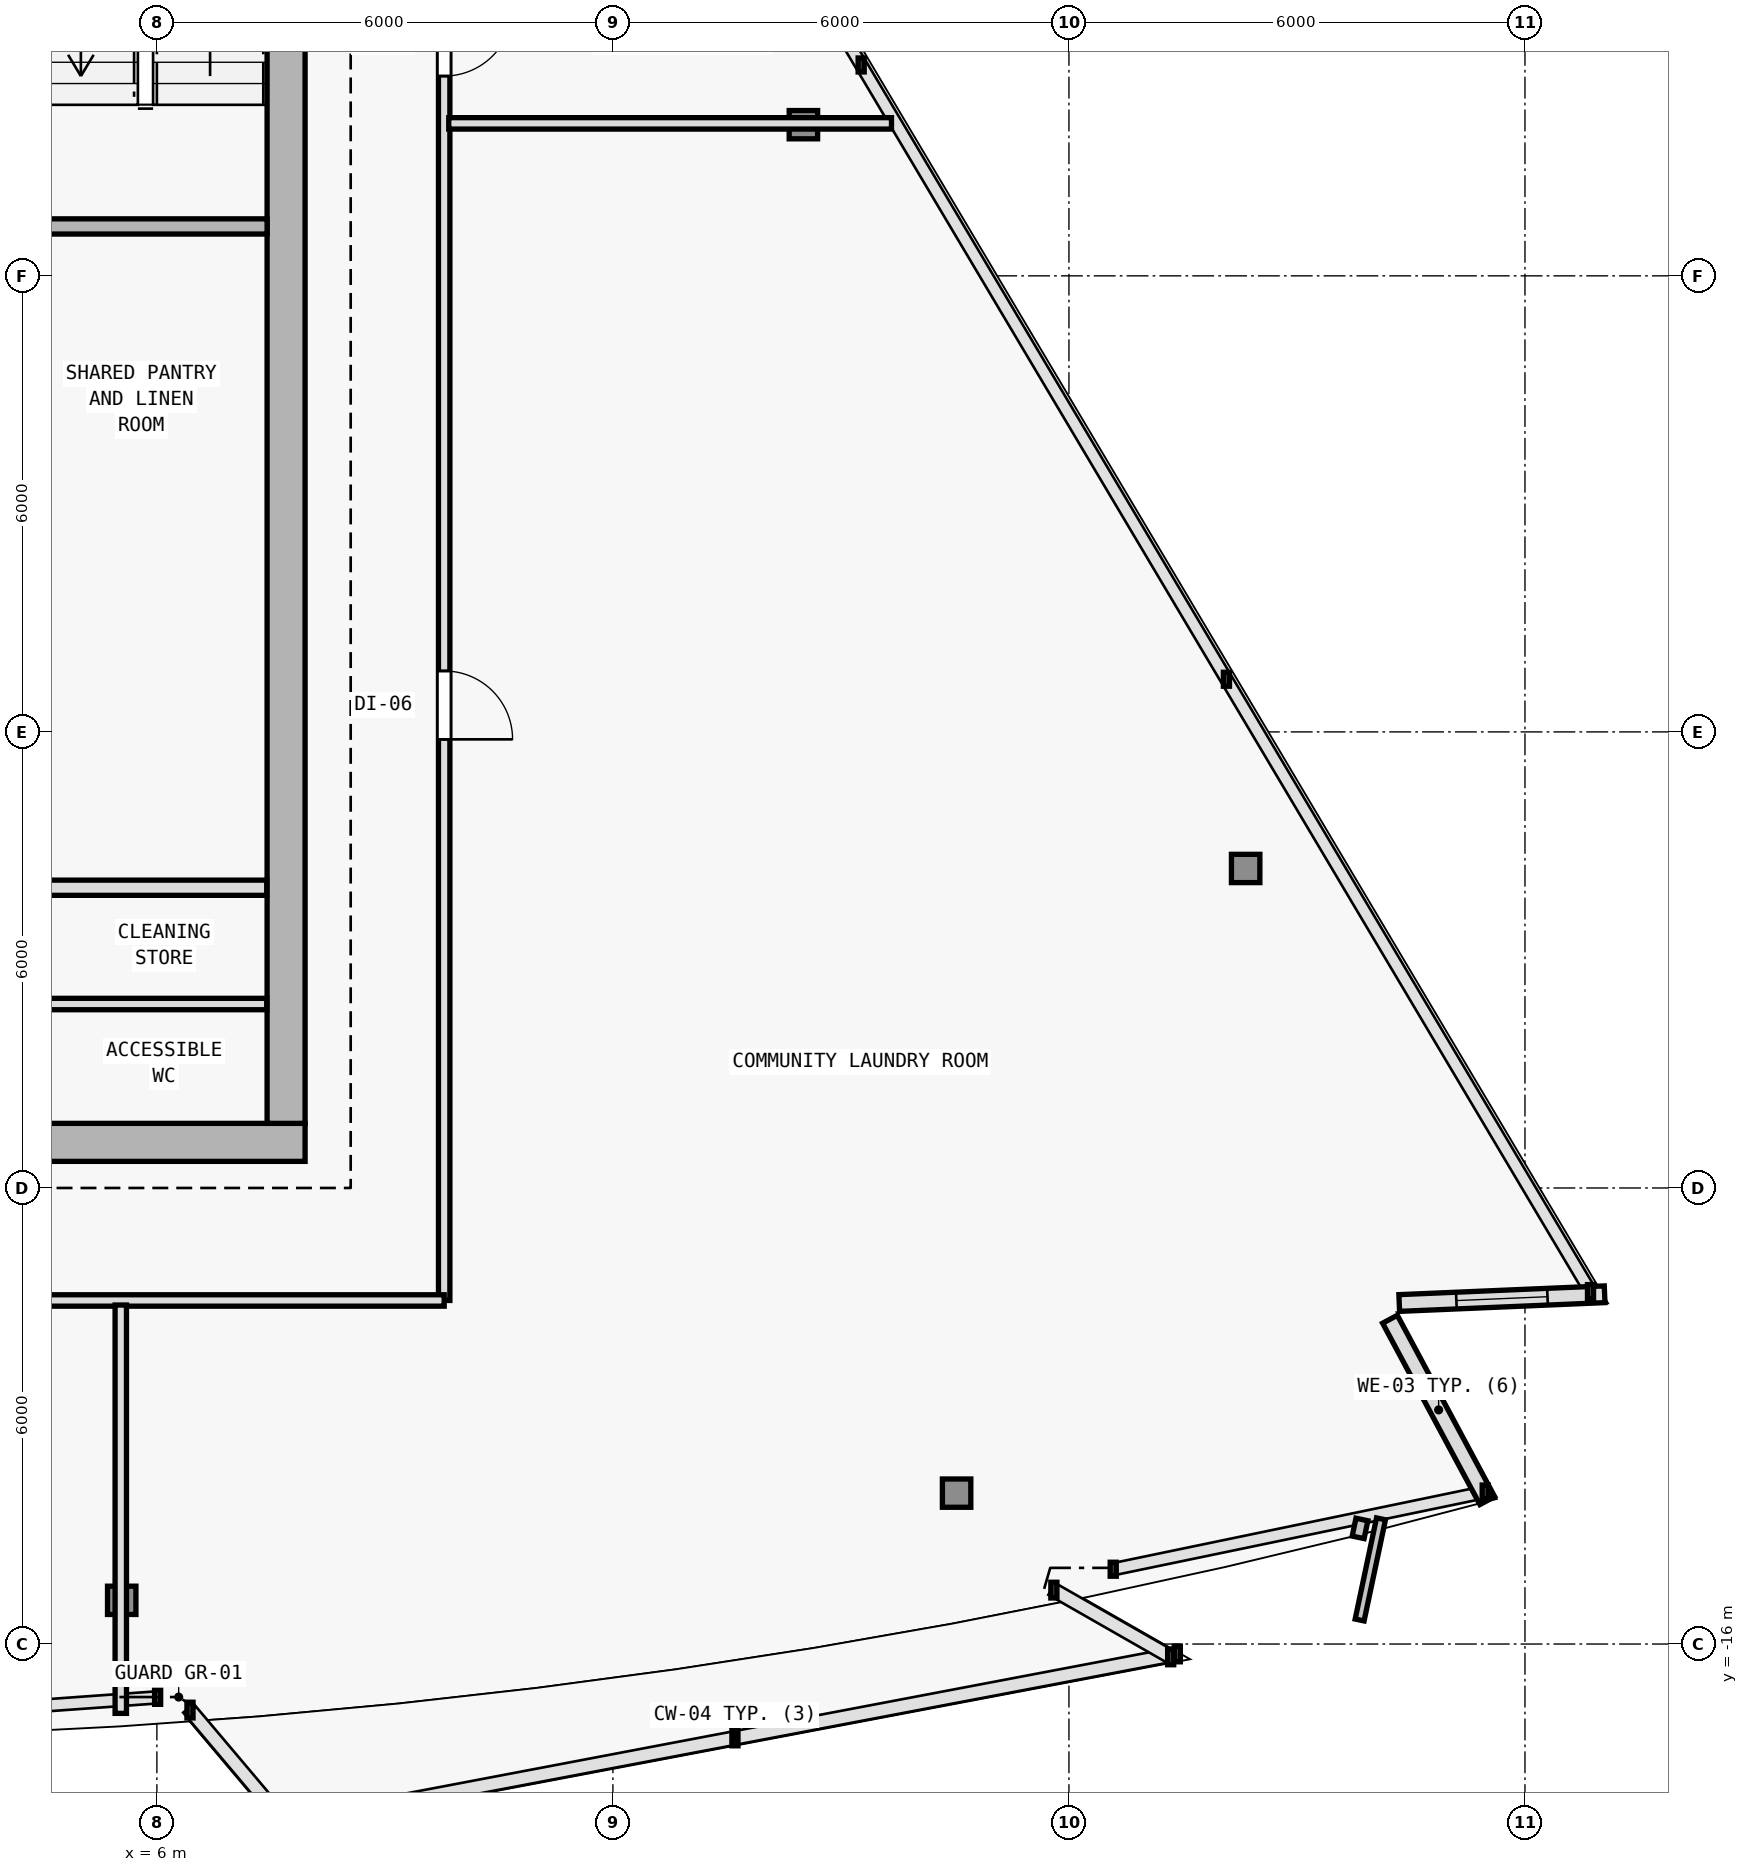
"""IFC4 building model, lengths in metres.
Left out: names, types, materials, properties, quantities, classifications, styles, units other than length and angle.
Written with IfcOpenShell. Run it as: python <this file> out.ifc"""

import sys

from ifc_helpers import new_model, si_unit, direction, frame, frame_2d, origin, origin_2d, place, context, subcontext, project, spatial, rectangle, i_section, extrude, element, fill, save


model = new_model("IFC4")
c1 = context("Model", 3, precision=1e-05, world=origin(), true_north=direction((0.0, 1.0)))
c2 = subcontext(c1, "Body", "Model", "MODEL_VIEW")
j1 = project(units=[si_unit("LENGTHUNIT", "METRE"), si_unit("PLANEANGLEUNIT", "RADIAN")], contexts=[c1])
p1 = place(None, origin())
s1 = spatial("IfcSite", under=j1, at=p1, CompositionType="ELEMENT")
p2 = place(p1, origin())
s2 = spatial("IfcBuilding", under=s1, at=p2, CompositionType="ELEMENT")
p3 = place(p2, frame((0.0, 0.0, 219.9)))
s3 = spatial("IfcBuildingStorey", under=s2, at=p3, CompositionType="ELEMENT", Elevation=219.9)
for number, where, z_axis, x_axis in (
    (1, (7.7, -9.4, 0.0), (0.0, 0.0, 1.0), (1.0, 0.0, 0.0)),
    (2, (7.7, 0.4, 0.0), (0.0, 0.0, 1.0), (1.0, 0.0, 0.0)),
):
    element("IfcColumn", number, at=place(p3, frame(where, z_axis=z_axis, x_axis=x_axis)), inside=s3, PredefinedType="COLUMN", context=c2, shape_type="SweptSolid", body=[
        extrude(i_section(OverallWidth=0.398, OverallDepth=0.387, WebThickness=0.013, FlangeThickness=0.022, FilletRadius=0.015, at=origin_2d()), origin(), (0.0, 0.0, 1.0), 3.6),
    ])
p4 = place(p3, frame((5.537, -15.425, 0.006), z_axis=(-0.006866308162, 0.0352833063, 0.999353762243), x_axis=(-0.981585848295, -0.191021523464, 0.0)))
e3 = element("IfcColumn", 3, at=p4, inside=s3, PredefinedType="COLUMN", context=c2, shape_type="SweptSolid", body=[
    extrude(i_section(OverallWidth=0.374, OverallDepth=0.372, WebThickness=0.012, FlangeThickness=0.02, FilletRadius=0.015, at=origin_2d()), origin(), (0.0, 0.0, 1.0), 3.591),
])
p5 = place(p3, frame((16.522, -14.015, 0.006), z_axis=(-0.020596292833, 0.033511459955, 0.999226087917), x_axis=(-0.851954850327, -0.523615252838, 0.0)))
e4 = element("IfcColumn", 4, at=p5, inside=s3, PredefinedType="COLUMN", context=c2, shape_type="SweptSolid", body=[
    extrude(i_section(OverallWidth=0.374, OverallDepth=0.372, WebThickness=0.012, FlangeThickness=0.02, FilletRadius=0.015, at=origin_2d()), origin(), (0.0, 0.0, 1.0), 3.592),
])
p6 = place(p3, frame((20.325, -5.797, 0.006), z_axis=(-0.026107436898, 0.021620221181, 0.999425318758), x_axis=(-0.637813971185, -0.770190455771, 0.0)))
e5 = element("IfcColumn", 5, at=p6, inside=s3, PredefinedType="COLUMN", context=c2, shape_type="SweptSolid", body=[
    extrude(i_section(OverallWidth=0.374, OverallDepth=0.372, WebThickness=0.012, FlangeThickness=0.02, FilletRadius=0.015, at=origin_2d()), origin(), (0.0, 0.0, 1.0), 3.591),
])
p7 = place(p3, frame((14.506, 3.989, 0.006), z_axis=(-0.018907314261, 0.009589680974, 0.999775250487), x_axis=(-0.452339157861, -0.891845999187, 0.0)))
e6 = element("IfcColumn", 6, at=p7, inside=s3, PredefinedType="COLUMN", context=c2, shape_type="SweptSolid", body=[
    extrude(i_section(OverallWidth=0.374, OverallDepth=0.372, WebThickness=0.012, FlangeThickness=0.02, FilletRadius=0.015, at=origin_2d()), origin(), (0.0, 0.0, 1.0), 3.59),
])
p8 = place(p3, frame((22.224, -11.727, 0.0), z_axis=(0.0, 0.0, 1.0), x_axis=(0.47278184311, -0.881179509989, 0.0)))
e7 = element("IfcWall", 7, at=p8, inside=s3, PredefinedType="SOLIDWALL", context=c2, shape_type="SweptSolid", body=[
    extrude(rectangle(XDim=2.708, YDim=0.22, at=frame_2d((1.354, 0.0))), origin(), (0.0, 0.0, 1.0), 3.35),
])
p9 = place(p3, frame((25.048, -11.398, 0.0), z_axis=(0.0, 0.0, 1.0), x_axis=(-0.999095922254, -0.042512799655, 0.0)))
e8 = element("IfcWall", 8, at=p9, inside=s3, PredefinedType="SOLIDWALL", context=c2, shape_type="SweptSolid", body=[
    extrude(rectangle(XDim=2.705, YDim=0.22, at=frame_2d((1.353, 0.0))), origin(), (0.0, 0.0, 1.0), 3.35),
])
p10 = place(p9, frame((0.752, 0.0, 0.62)))
e9 = element("IfcOpeningElement", 9, at=p10, cuts=e8, PredefinedType="OPENING", context=c2, shape_type="SweptSolid", body=[
    extrude(rectangle(XDim=1.2, YDim=1.8, at=frame_2d((0.6, 0.9))), frame((0.0, 0.12, 0.0), z_axis=(0.0, -1.0, 0.0), x_axis=(1.0, 0.0, 0.0)), (0.0, 0.0, 1.0), 0.24),
])
p11 = place(p3, frame((-7.95, -9.4, 0.0), z_axis=(0.0, 0.0, 1.0), x_axis=(1.0, 0.0, 0.0)))
e10 = element("IfcWall", 10, at=p11, inside=s3, PredefinedType="SHEAR", context=c2, shape_type="SweptSolid", body=[
    extrude(rectangle(XDim=15.9, YDim=0.5, at=frame_2d((7.95, 0.0))), origin(), (0.0, 0.0, 1.0), 3.35),
])
p12 = place(p11, frame((9.6, 0.0, 0.0)))
e11 = element("IfcOpeningElement", 11, at=p12, cuts=e10, PredefinedType="OPENING", context=c2, shape_type="SweptSolid", body=[
    extrude(rectangle(XDim=1.5, YDim=2.2, at=frame_2d((0.75, 1.1))), frame((0.0, 0.26, 0.0), z_axis=(0.0, -1.0, 0.0), x_axis=(1.0, 0.0, 0.0)), (0.0, 0.0, 1.0), 0.52),
])
p13 = place(p3, frame((7.7, 9.95, 0.0), z_axis=(0.0, 0.0, 1.0), x_axis=(0.0, -1.0, 0.0)))
e12 = element("IfcWall", 12, at=p13, inside=s3, PredefinedType="SHEAR", context=c2, shape_type="SweptSolid", body=[
    extrude(rectangle(XDim=19.1, YDim=0.5, at=frame_2d((9.55, 0.0))), origin(), (0.0, 0.0, 1.0), 3.35),
])
p14 = place(p3, frame((4.05, 2.65, 0.0), z_axis=(0.0, 0.0, 1.0), x_axis=(1.0, 0.0, 0.0)))
e13 = element("IfcWall", 13, at=p14, inside=s3, PredefinedType="SOLIDWALL", context=c2, shape_type="SweptSolid", body=[
    extrude(rectangle(XDim=3.4, YDim=0.2, at=frame_2d((1.7, 0.0))), origin(), (0.0, 0.0, 1.0), 3.35),
])
p15 = place(p3, frame((4.15, -6.05, 0.0), z_axis=(0.0, 0.0, 1.0), x_axis=(1.0, 0.0, 0.0)))
e14 = element("IfcWall", 14, at=p15, inside=s3, PredefinedType="SOLIDWALL", context=c2, shape_type="SweptSolid", body=[
    extrude(rectangle(XDim=3.295, YDim=0.2, at=frame_2d((1.647, 0.0))), origin(), (0.0, 0.0, 1.0), 3.35),
])
p16 = place(p3, frame((4.15, -7.58, 0.0), z_axis=(0.0, 0.0, 1.0), x_axis=(1.0, 0.0, 0.0)))
e15 = element("IfcWall", 15, at=p16, inside=s3, PredefinedType="PARTITIONING", context=c2, shape_type="SweptSolid", body=[
    extrude(rectangle(XDim=3.295, YDim=0.15, at=frame_2d((1.647, 0.0))), origin(), (0.0, 0.0, 1.0), 3.35),
])
p17 = place(p3, frame((9.78, 8.226, 0.0), z_axis=(0.0, 0.0, 1.0), x_axis=(0.0, -1.0, 0.0)))
e16 = element("IfcWall", 16, at=p17, inside=s3, PredefinedType="PARTITIONING", context=c2, shape_type="SweptSolid", body=[
    extrude(rectangle(XDim=19.706, YDim=0.15, at=frame_2d((9.853, 0.0))), origin(), (0.0, 0.0, 1.0), 2.725),
])
p18 = place(p17, frame((11.424, 0.0, 0.0)))
e17 = element("IfcOpeningElement", 17, at=p18, cuts=e16, PredefinedType="OPENING", context=c2, shape_type="SweptSolid", body=[
    extrude(rectangle(XDim=0.9, YDim=2.1, at=frame_2d((0.45, 1.05))), frame((0.0, 0.085, 0.0), z_axis=(0.0, -1.0, 0.0), x_axis=(1.0, 0.0, 0.0)), (0.0, 0.0, 1.0), 0.17),
])
p19 = place(p17, frame((2.698, 0.0, 0.0)))
e18 = element("IfcOpeningElement", 18, at=p19, cuts=e16, PredefinedType="OPENING", context=c2, shape_type="SweptSolid", body=[
    extrude(rectangle(XDim=0.9, YDim=2.1, at=frame_2d((0.45, 1.05))), frame((0.0, 0.085, 0.0), z_axis=(0.0, -1.0, 0.0), x_axis=(1.0, 0.0, 0.0)), (0.0, 0.0, 1.0), 0.17),
])
p20 = place(p17, frame((0.677, 0.0, 0.0)))
e19 = element("IfcOpeningElement", 19, at=p20, cuts=e16, PredefinedType="OPENING", context=c2, shape_type="SweptSolid", body=[
    extrude(rectangle(XDim=0.9, YDim=2.1, at=frame_2d((0.45, 1.05))), frame((0.0, 0.085, 0.0), z_axis=(0.0, -1.0, 0.0), x_axis=(1.0, 0.0, 0.0)), (0.0, 0.0, 1.0), 0.17),
])
p21 = place(p3, frame((9.78, -11.48, 0.0), z_axis=(0.0, 0.0, 1.0), x_axis=(-1.0, 0.0, 0.0)))
e20 = element("IfcWall", 20, at=p21, inside=s3, PredefinedType="PARTITIONING", context=c2, shape_type="SweptSolid", body=[
    extrude(rectangle(XDim=19.56, YDim=0.15, at=frame_2d((9.78, 0.0))), origin(), (0.0, 0.0, 1.0), 3.005),
])
p22 = place(p21, frame((12.19, 0.0, 0.0)))
e21 = element("IfcOpeningElement", 21, at=p22, cuts=e20, PredefinedType="OPENING", context=c2, shape_type="SweptSolid", body=[
    extrude(rectangle(XDim=0.9, YDim=2.1, at=frame_2d((0.45, 1.05))), frame((0.0, 0.085, 0.0), z_axis=(0.0, -1.0, 0.0), x_axis=(1.0, 0.0, 0.0)), (0.0, 0.0, 1.0), 0.17),
])
p23 = place(p21, frame((6.665, 0.0, 0.0)))
e22 = element("IfcOpeningElement", 22, at=p23, cuts=e20, PredefinedType="OPENING", context=c2, shape_type="SweptSolid", body=[
    extrude(rectangle(XDim=0.9, YDim=2.1, at=frame_2d((0.45, 1.05))), frame((0.0, 0.085, 0.0), z_axis=(0.0, -1.0, 0.0), x_axis=(1.0, 0.0, 0.0)), (0.0, 0.0, 1.0), 0.17),
])
p24 = place(p3, frame((5.525, -11.54, 0.0), z_axis=(0.0, 0.0, 1.0), x_axis=(0.0, -1.0, 0.0)))
e23 = element("IfcWall", 23, at=p24, inside=s3, PredefinedType="PARTITIONING", context=c2, shape_type="SweptSolid", body=[
    extrude(rectangle(XDim=5.372, YDim=0.15, at=frame_2d((2.686, 0.0))), origin(), (0.0, 0.0, 1.0), 2.975),
])
p25 = place(p3, frame((9.84, 4.006, 0.0), z_axis=(0.0, 0.0, 1.0), x_axis=(1.0, 0.0, 0.0)))
e24 = element("IfcWall", 24, at=p25, inside=s3, PredefinedType="PARTITIONING", context=c2, shape_type="SweptSolid", body=[
    extrude(rectangle(XDim=5.825, YDim=0.15, at=frame_2d((2.913, 0.0))), origin(), (0.0, 0.0, 1.0), 2.825),
])
p26 = place(p10, origin())
e25 = element("IfcWindow", 25, at=p26, inside=s3, PartitioningType="SINGLE_PANEL", PredefinedType="WINDOW", context=c2, shape_type="SweptSolid", body=[
    extrude(rectangle(XDim=1.2, YDim=1.8, at=frame_2d((0.6, 0.9))), frame((0.0, 0.03, 0.0), z_axis=(0.0, -1.0, 0.0), x_axis=(1.0, 0.0, 0.0)), (0.0, 0.0, 1.0), 0.06),
])
fill(e9, e25)
p27 = place(p18, origin())
e26 = element("IfcDoor", 26, at=p27, inside=s3, OperationType="SINGLE_SWING_RIGHT", PredefinedType="DOOR", context=c2, shape_type="SweptSolid", body=[
    extrude(rectangle(XDim=0.9, YDim=2.1, at=frame_2d((0.45, 1.05))), frame((0.0, 0.025, 0.0), z_axis=(0.0, -1.0, 0.0), x_axis=(1.0, 0.0, 0.0)), (0.0, 0.0, 1.0), 0.05),
])
fill(e17, e26)
p28 = place(p19, origin())
e27 = element("IfcDoor", 27, at=p28, inside=s3, OperationType="SINGLE_SWING_LEFT", PredefinedType="DOOR", context=c2, shape_type="SweptSolid", body=[
    extrude(rectangle(XDim=0.9, YDim=2.1, at=frame_2d((0.45, 1.05))), frame((0.0, 0.025, 0.0), z_axis=(0.0, -1.0, 0.0), x_axis=(1.0, 0.0, 0.0)), (0.0, 0.0, 1.0), 0.05),
])
fill(e18, e27)
save(model, sys.argv[1])
